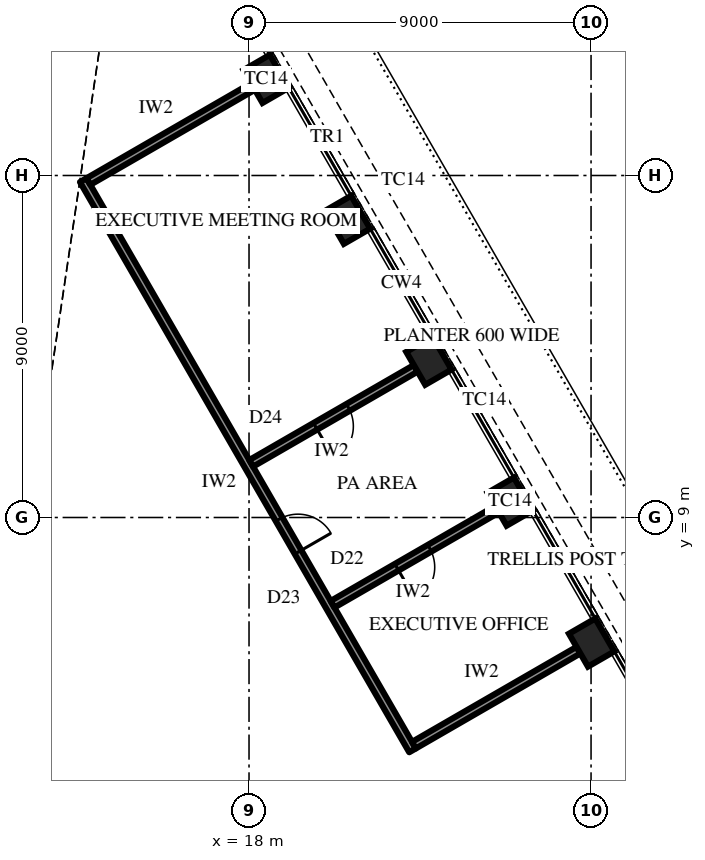
"""IFC4 building model, lengths in metres.
Left out: names, types, materials, properties, quantities, classifications, styles, units other than length and angle.
Written with IfcOpenShell. Run it as: python <this file> out.ifc"""

import sys

from ifc_helpers import new_model, si_unit, direction, frame, frame_2d, origin, origin_2d, place, context, subcontext, project, spatial, rectangle, extrude, element, fill, save


model = new_model("IFC4")
c1 = context("Model", 3, precision=1e-05, world=origin(), true_north=direction((0.0, 1.0)))
c2 = subcontext(c1, "Body", "Model", "MODEL_VIEW")
j1 = project(units=[si_unit("LENGTHUNIT", "METRE"), si_unit("PLANEANGLEUNIT", "RADIAN")], contexts=[c1])
p1 = place(None, origin())
s1 = spatial("IfcSite", under=j1, at=p1, CompositionType="ELEMENT")
p2 = place(p1, origin())
s2 = spatial("IfcBuilding", under=s1, at=p2, CompositionType="ELEMENT")
p3 = place(p2, frame((0.0, 0.0, 349.3)))
s3 = spatial("IfcBuildingStorey", under=s2, at=p3, CompositionType="ELEMENT", Elevation=349.3)
for number, where, z_axis, x_axis in (
    (1, (27.015, 5.708, 0.0), (0.0, 0.0, 1.0), (-0.5, 0.866, 0.0)),
    (2, (24.874, 9.417, 0.0), (0.0, 0.0, 1.0), (-0.5, 0.866, 0.0)),
    (3, (22.733, 13.125, 0.0), (0.0, 0.0, 1.0), (-0.5, 0.866, 0.0)),
    (4, (20.592, 16.833, 0.0), (0.0, 0.0, 1.0), (-0.5, 0.866, 0.0)),
    (5, (18.451, 20.542, 0.0), (0.0, 0.0, 1.0), (-0.5, 0.866, 0.0)),
):
    element("IfcColumn", number, at=place(p3, frame(where, z_axis=z_axis, x_axis=x_axis)), inside=s3, PredefinedType="COLUMN", context=c2, shape_type="SweptSolid", body=[
        extrude(rectangle(XDim=1.0, YDim=0.8, at=origin_2d()), origin(), (0.0, 0.0, 1.0), 4.2),
    ])
p4 = place(p3, frame((22.302, 2.872, 0.0), z_axis=(0.0, 0.0, 1.0), x_axis=(-0.500006217173, 0.866021814268, 0.0)))
e6 = element("IfcWall", 6, at=p4, inside=s3, PredefinedType="PARTITIONING", context=c2, shape_type="SweptSolid", body=[
    extrude(rectangle(XDim=17.328, YDim=0.2, at=frame_2d((8.664, 0.0))), origin(), (0.0, 0.0, 1.0), 4.0),
])
p5 = place(p4, frame((6.023, 0.0, 0.0)))
e7 = element("IfcOpeningElement", 7, at=p5, cuts=e6, PredefinedType="OPENING", context=c2, shape_type="SweptSolid", body=[
    extrude(rectangle(XDim=1.0, YDim=2.2, at=frame_2d((0.5, 1.1))), frame((0.0, 0.11, 0.0), z_axis=(0.0, -1.0, 0.0), x_axis=(1.0, 0.0, 0.0)), (0.0, 0.0, 1.0), 0.22),
])
p6 = place(p3, frame((22.339, 3.008, 0.0), z_axis=(0.0, 0.0, 1.0), x_axis=(0.866022959057, 0.500004234368, 0.0)))
e8 = element("IfcWall", 8, at=p6, inside=s3, PredefinedType="PARTITIONING", context=c2, shape_type="SweptSolid", body=[
    extrude(rectangle(XDim=5.0, YDim=0.2, at=frame_2d((2.5, 0.0))), origin(), (0.0, 0.0, 1.0), 3.082),
])
p7 = place(p3, frame((20.198, 6.717, 0.0), z_axis=(0.0, 0.0, 1.0), x_axis=(0.866022959057, 0.500004234368, 0.0)))
e9 = element("IfcWall", 9, at=p7, inside=s3, PredefinedType="PARTITIONING", context=c2, shape_type="SweptSolid", body=[
    extrude(rectangle(XDim=5.0, YDim=0.2, at=frame_2d((2.5, 0.0))), origin(), (0.0, 0.0, 1.0), 2.992),
])
p8 = place(p7, frame((1.95, 0.0, 0.0)))
e10 = element("IfcOpeningElement", 10, at=p8, cuts=e9, PredefinedType="OPENING", context=c2, shape_type="SweptSolid", body=[
    extrude(rectangle(XDim=1.0, YDim=2.2, at=frame_2d((0.5, 1.1))), frame((0.0, 0.11, 0.0), z_axis=(0.0, -1.0, 0.0), x_axis=(1.0, 0.0, 0.0)), (0.0, 0.0, 1.0), 0.22),
])
p9 = place(p3, frame((18.057, 10.425, 0.0), z_axis=(0.0, 0.0, 1.0), x_axis=(0.866022959057, 0.500004234368, 0.0)))
e11 = element("IfcWall", 11, at=p9, inside=s3, PredefinedType="PARTITIONING", context=c2, shape_type="SweptSolid", body=[
    extrude(rectangle(XDim=5.0, YDim=0.2, at=frame_2d((2.5, 0.0))), origin(), (0.0, 0.0, 1.0), 3.082),
])
p10 = place(p9, frame((1.95, 0.0, 0.0)))
e12 = element("IfcOpeningElement", 12, at=p10, cuts=e11, PredefinedType="OPENING", context=c2, shape_type="SweptSolid", body=[
    extrude(rectangle(XDim=1.0, YDim=2.2, at=frame_2d((0.5, 1.1))), frame((0.0, 0.11, 0.0), z_axis=(0.0, -1.0, 0.0), x_axis=(1.0, 0.0, 0.0)), (0.0, 0.0, 1.0), 0.22),
])
p11 = place(p3, frame((13.775, 17.842, 0.0), z_axis=(0.0, 0.0, 1.0), x_axis=(0.866022959057, 0.500004234368, 0.0)))
e13 = element("IfcWall", 13, at=p11, inside=s3, PredefinedType="PARTITIONING", context=c2, shape_type="SweptSolid", body=[
    extrude(rectangle(XDim=5.0, YDim=0.2, at=frame_2d((2.5, 0.0))), origin(), (0.0, 0.0, 1.0), 3.082),
])
p12 = place(p8, frame((1.0, 0.0, 0.0), z_axis=(0.0, 0.0, 1.0), x_axis=(-1.0, 0.0, 0.0)))
e14 = element("IfcDoor", 14, at=p12, inside=s3, OperationType="SINGLE_SWING_LEFT", PredefinedType="DOOR", context=c2, shape_type="SweptSolid", body=[
    extrude(rectangle(XDim=1.0, YDim=2.2, at=frame_2d((0.5, 1.1))), frame((0.0, 0.025, 0.0), z_axis=(0.0, -1.0, 0.0), x_axis=(1.0, 0.0, 0.0)), (0.0, 0.0, 1.0), 0.05),
])
fill(e10, e14)
p13 = place(p5, frame((1.0, 0.0, 0.0), z_axis=(0.0, 0.0, 1.0), x_axis=(-1.0, 0.0, 0.0)))
e15 = element("IfcDoor", 15, at=p13, inside=s3, OperationType="SINGLE_SWING_LEFT", PredefinedType="DOOR", context=c2, shape_type="SweptSolid", body=[
    extrude(rectangle(XDim=1.0, YDim=2.2, at=frame_2d((0.5, 1.1))), frame((0.0, 0.025, 0.0), z_axis=(0.0, -1.0, 0.0), x_axis=(1.0, 0.0, 0.0)), (0.0, 0.0, 1.0), 0.05),
])
fill(e7, e15)
p14 = place(p10, frame((1.0, 0.0, 0.0), z_axis=(0.0, 0.0, 1.0), x_axis=(-1.0, 0.0, 0.0)))
e16 = element("IfcDoor", 16, at=p14, inside=s3, OperationType="SINGLE_SWING_LEFT", PredefinedType="DOOR", context=c2, shape_type="SweptSolid", body=[
    extrude(rectangle(XDim=1.0, YDim=2.2, at=frame_2d((0.5, 1.1))), frame((0.0, 0.025, 0.0), z_axis=(0.0, -1.0, 0.0), x_axis=(1.0, 0.0, 0.0)), (0.0, 0.0, 1.0), 0.05),
])
fill(e12, e16)
save(model, sys.argv[1])
